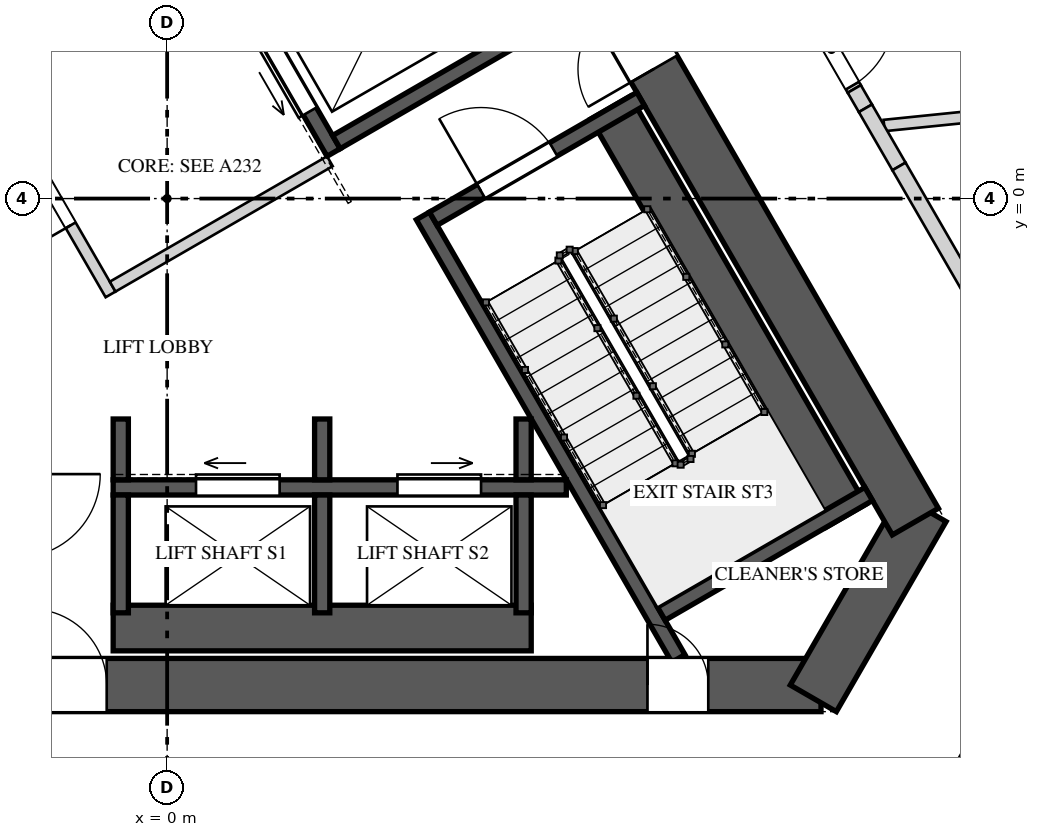
"""IFC4 building model, lengths in metres.
Left out: names, types, materials, properties, quantities, classifications, styles, units other than length and angle.
Written with IfcOpenShell. Run it as: python <this file> out.ifc"""

import sys

from ifc_helpers import new_model, si_unit, direction, frame, frame_2d, origin, place, context, subcontext, project, spatial, polyline, rectangle, outline, extrude, element, fill, save


model = new_model("IFC4")
c1 = context("Model", 3, precision=1e-05, world=origin(), true_north=direction((0.0, 1.0)))
c2 = subcontext(c1, "Body", "Model", "MODEL_VIEW")
j1 = project(units=[si_unit("LENGTHUNIT", "METRE"), si_unit("PLANEANGLEUNIT", "RADIAN")], contexts=[c1])
p1 = place(None, origin())
s1 = spatial("IfcSite", under=j1, at=p1, CompositionType="ELEMENT")
p2 = place(p1, origin())
s2 = spatial("IfcBuilding", under=s1, at=p2, CompositionType="ELEMENT")
p3 = place(p2, frame((0.0, 0.0, 237.2)))
s3 = spatial("IfcBuildingStorey", under=s2, at=p3, CompositionType="ELEMENT", Elevation=237.2)
p4 = place(p3, frame((-1.241, 10.65, 0.0), z_axis=(0.0, 0.0, 1.0), x_axis=(-0.500003331888, -0.866023480109, 0.0)))
e1 = element("IfcWall", 1, at=p4, inside=s3, PredefinedType="SHEAR", context=c2, shape_type="SweptSolid", body=[
    extrude(rectangle(XDim=17.205, YDim=0.7, at=frame_2d((8.603, 0.0))), origin(), (0.0, 0.0, 1.0), 4.0),
])
p5 = place(p4, frame((6.808, 0.0, 0.0)))
e2 = element("IfcOpeningElement", 2, at=p5, cuts=e1, PredefinedType="OPENING", context=c2, shape_type="SweptSolid", body=[
    extrude(rectangle(XDim=1.0, YDim=2.4, at=frame_2d((0.5, 1.2))), frame((0.0, 0.36, 0.0), z_axis=(0.0, -1.0, 0.0), x_axis=(1.0, 0.0, 0.0)), (0.0, 0.0, 1.0), 0.72),
])
p6 = place(p4, frame((14.922, 0.0, 0.0)))
e3 = element("IfcOpeningElement", 3, at=p6, cuts=e1, PredefinedType="OPENING", context=c2, shape_type="SweptSolid", body=[
    extrude(rectangle(XDim=0.8, YDim=2.1, at=frame_2d((0.4, 1.05))), frame((0.0, 0.36, 0.0), z_axis=(0.0, -1.0, 0.0), x_axis=(1.0, 0.0, 0.0)), (0.0, 0.0, 1.0), 0.72),
])
p7 = place(p3, frame((-8.603, -6.4, 0.0), z_axis=(0.0, 0.0, 1.0), x_axis=(1.0, 0.0, 0.0)))
e4 = element("IfcWall", 4, at=p7, inside=s3, PredefinedType="SHEAR", context=c2, shape_type="SweptSolid", body=[
    extrude(rectangle(XDim=17.205, YDim=0.7, at=frame_2d((8.603, 0.0))), origin(), (0.0, 0.0, 1.0), 4.0),
])
p8 = place(p7, frame((6.808, 0.0, 0.0)))
e5 = element("IfcOpeningElement", 5, at=p8, cuts=e4, PredefinedType="OPENING", context=c2, shape_type="SweptSolid", body=[
    extrude(rectangle(XDim=1.0, YDim=2.4, at=frame_2d((0.5, 1.2))), frame((0.0, 0.36, 0.0), z_axis=(0.0, -1.0, 0.0), x_axis=(1.0, 0.0, 0.0)), (0.0, 0.0, 1.0), 0.72),
])
p9 = place(p7, frame((14.922, 0.0, 0.0)))
e6 = element("IfcOpeningElement", 6, at=p9, cuts=e4, PredefinedType="OPENING", context=c2, shape_type="SweptSolid", body=[
    extrude(rectangle(XDim=0.8, YDim=2.1, at=frame_2d((0.4, 1.05))), frame((0.0, 0.36, 0.0), z_axis=(0.0, -1.0, 0.0), x_axis=(1.0, 0.0, 0.0)), (0.0, 0.0, 1.0), 0.72),
])
p10 = place(p3, frame((8.501, -6.575, 0.0), z_axis=(0.0, 0.0, 1.0), x_axis=(0.499995765644, 0.866027848477, 0.0)))
e7 = element("IfcWall", 7, at=p10, inside=s3, PredefinedType="SHEAR", context=c2, shape_type="SweptSolid", body=[
    extrude(rectangle(XDim=2.887, YDim=0.7, at=frame_2d((1.443, 0.0))), origin(), (0.0, 0.0, 1.0), 4.0),
])
p11 = place(p3, frame((9.844, -4.25, 0.0), z_axis=(0.0, 0.0, 1.0), x_axis=(-0.500003331888, 0.866023480109, 0.0)))
e8 = element("IfcWall", 8, at=p11, inside=s3, PredefinedType="SHEAR", context=c2, shape_type="SweptSolid", body=[
    extrude(rectangle(XDim=17.205, YDim=0.7, at=frame_2d((8.603, 0.0))), origin(), (0.0, 0.0, 1.0), 4.0),
])
p12 = place(p11, frame((6.877, 0.0, 0.0)))
e9 = element("IfcOpeningElement", 9, at=p12, cuts=e8, PredefinedType="OPENING", context=c2, shape_type="SweptSolid", body=[
    extrude(rectangle(XDim=1.0, YDim=2.4, at=frame_2d((0.5, 1.2))), frame((0.0, 0.36, 0.0), z_axis=(0.0, -1.0, 0.0), x_axis=(1.0, 0.0, 0.0)), (0.0, 0.0, 1.0), 0.72),
])
p13 = place(p3, frame((8.933, -4.172, 0.0), z_axis=(0.0, 0.0, 1.0), x_axis=(-0.500026960575, 0.86600983753, 0.0)))
e10 = element("IfcWall", 10, at=p13, inside=s3, PredefinedType="SOLIDWALL", context=c2, shape_type="SweptSolid", body=[
    extrude(rectangle(XDim=6.2, YDim=0.6, at=frame_2d((3.1, 0.0))), origin(), (0.0, 0.0, 1.0), 3.65),
])
p14 = place(p3, frame((6.726, -6.05, 0.0), z_axis=(0.0, 0.0, 1.0), x_axis=(-0.499970804718, 0.866042259032, 0.0)))
e11 = element("IfcWall", 11, at=p14, inside=s3, PredefinedType="SOLIDWALL", context=c2, shape_type="SweptSolid", body=[
    extrude(rectangle(XDim=6.723, YDim=0.2, at=frame_2d((3.361, 0.0))), origin(), (0.0, 0.0, 1.0), 3.65),
])
p15 = place(p3, frame((6.501, -5.461, 0.0), z_axis=(0.0, 0.0, 1.0), x_axis=(0.866035871367, 0.499981869177, 0.0)))
e12 = element("IfcWall", 12, at=p15, inside=s3, PredefinedType="SOLIDWALL", context=c2, shape_type="SweptSolid", body=[
    extrude(rectangle(XDim=3.15, YDim=0.2, at=frame_2d((1.575, 0.0))), origin(), (0.0, 0.0, 1.0), 3.65),
])
p16 = place(p3, frame((3.501, -0.265, 0.0), z_axis=(0.0, 0.0, 1.0), x_axis=(0.866035871367, 0.499981869177, 0.0)))
e13 = element("IfcWall", 13, at=p16, inside=s3, PredefinedType="SOLIDWALL", context=c2, shape_type="SweptSolid", body=[
    extrude(rectangle(XDim=3.15, YDim=0.2, at=frame_2d((1.575, 0.0))), origin(), (0.0, 0.0, 1.0), 3.65),
])
p17 = place(p16, frame((0.725, 0.0, 0.0)))
e14 = element("IfcOpeningElement", 14, at=p17, cuts=e13, PredefinedType="OPENING", context=c2, shape_type="SweptSolid", body=[
    extrude(rectangle(XDim=1.1, YDim=2.4, at=frame_2d((0.55, 1.2))), frame((0.0, 0.11, 0.0), z_axis=(0.0, -1.0, 0.0), x_axis=(1.0, 0.0, 0.0)), (0.0, 0.0, 1.0), 0.22),
])
p18 = place(p3, frame((-0.71, -3.8, 0.0), z_axis=(0.0, 0.0, 1.0), x_axis=(1.0, 0.0, 0.0)))
e15 = element("IfcWall", 15, at=p18, inside=s3, PredefinedType="SOLIDWALL", context=c2, shape_type="SweptSolid", body=[
    extrude(rectangle(XDim=5.961, YDim=0.2, at=frame_2d((2.981, 0.0))), origin(), (0.0, 0.0, 1.0), 3.65),
])
p19 = place(p18, frame((1.09, 0.0, 0.0)))
e16 = element("IfcOpeningElement", 16, at=p19, cuts=e15, PredefinedType="OPENING", context=c2, shape_type="SweptSolid", body=[
    extrude(rectangle(XDim=1.1, YDim=2.1, at=frame_2d((0.55, 1.05))), frame((0.0, 0.11, 0.0), z_axis=(0.0, -1.0, 0.0), x_axis=(1.0, 0.0, 0.0)), (0.0, 0.0, 1.0), 0.22),
])
p20 = place(p18, frame((3.74, 0.0, 0.0)))
e17 = element("IfcOpeningElement", 17, at=p20, cuts=e15, PredefinedType="OPENING", context=c2, shape_type="SweptSolid", body=[
    extrude(rectangle(XDim=1.1, YDim=2.1, at=frame_2d((0.55, 1.05))), frame((0.0, 0.11, 0.0), z_axis=(0.0, -1.0, 0.0), x_axis=(1.0, 0.0, 0.0)), (0.0, 0.0, 1.0), 0.22),
])
p21 = place(p3, frame((-0.71, -5.65, 0.0), z_axis=(0.0, 0.0, 1.0), x_axis=(1.0, 0.0, 0.0)))
e18 = element("IfcWall", 18, at=p21, inside=s3, PredefinedType="SOLIDWALL", context=c2, shape_type="SweptSolid", body=[
    extrude(rectangle(XDim=5.5, YDim=0.6, at=frame_2d((2.75, 0.0))), origin(), (0.0, 0.0, 1.0), 3.65),
])
p22 = place(p3, frame((-0.61, -3.9, 0.0), z_axis=(0.0, 0.0, 1.0), x_axis=(0.0, -1.0, 0.0)))
e19 = element("IfcWall", 19, at=p22, inside=s3, PredefinedType="SOLIDWALL", context=c2, shape_type="SweptSolid", body=[
    extrude(rectangle(XDim=1.55, YDim=0.2, at=frame_2d((0.775, 0.0))), origin(), (0.0, 0.0, 1.0), 3.65),
])
p23 = place(p3, frame((-0.61, -2.9, 0.0), z_axis=(0.0, 0.0, 1.0), x_axis=(0.0, -1.0, 0.0)))
e20 = element("IfcWall", 20, at=p23, inside=s3, PredefinedType="SOLIDWALL", context=c2, shape_type="SweptSolid", body=[
    extrude(rectangle(XDim=0.8, YDim=0.2, at=frame_2d((0.4, 0.0))), origin(), (0.0, 0.0, 1.0), 3.65),
])
p24 = place(p3, frame((2.04, -3.9, 0.0), z_axis=(0.0, 0.0, 1.0), x_axis=(0.0, -1.0, 0.0)))
e21 = element("IfcWall", 21, at=p24, inside=s3, PredefinedType="SOLIDWALL", context=c2, shape_type="SweptSolid", body=[
    extrude(rectangle(XDim=1.55, YDim=0.2, at=frame_2d((0.775, 0.0))), origin(), (0.0, 0.0, 1.0), 3.65),
])
p25 = place(p3, frame((2.04, -2.9, 0.0), z_axis=(0.0, 0.0, 1.0), x_axis=(0.0, -1.0, 0.0)))
e22 = element("IfcWall", 22, at=p25, inside=s3, PredefinedType="SOLIDWALL", context=c2, shape_type="SweptSolid", body=[
    extrude(rectangle(XDim=0.8, YDim=0.2, at=frame_2d((0.4, 0.0))), origin(), (0.0, 0.0, 1.0), 3.65),
])
p26 = place(p3, frame((4.69, -3.9, 0.0), z_axis=(0.0, 0.0, 1.0), x_axis=(0.0, -1.0, 0.0)))
e23 = element("IfcWall", 23, at=p26, inside=s3, PredefinedType="SOLIDWALL", context=c2, shape_type="SweptSolid", body=[
    extrude(rectangle(XDim=1.55, YDim=0.2, at=frame_2d((0.775, 0.0))), origin(), (0.0, 0.0, 1.0), 3.65),
])
p27 = place(p3, frame((4.69, -2.9, 0.0), z_axis=(0.0, 0.0, 1.0), x_axis=(0.0, -1.0, 0.0)))
e24 = element("IfcWall", 24, at=p27, inside=s3, PredefinedType="SOLIDWALL", context=c2, shape_type="SweptSolid", body=[
    extrude(rectangle(XDim=0.8, YDim=0.2, at=frame_2d((0.4, 0.0))), origin(), (0.0, 0.0, 1.0), 3.65),
])
p28 = place(p3, frame((2.19, 0.606, 0.0), z_axis=(0.0, 0.0, 1.0), x_axis=(-0.500002801628, 0.866023786258, 0.0)))
e25 = element("IfcWall", 25, at=p28, inside=s3, PredefinedType="SOLIDWALL", context=c2, shape_type="SweptSolid", body=[
    extrude(rectangle(XDim=4.9, YDim=0.2, at=frame_2d((2.45, 0.0))), origin(), (0.0, 0.0, 1.0), 3.65),
])
p29 = place(p28, frame((0.625, 0.0, 0.0)))
e26 = element("IfcOpeningElement", 26, at=p29, cuts=e25, PredefinedType="OPENING", context=c2, shape_type="SweptSolid", body=[
    extrude(rectangle(XDim=1.3, YDim=2.1, at=frame_2d((0.65, 1.05))), frame((0.0, 0.11, 0.0), z_axis=(0.0, -1.0, 0.0), x_axis=(1.0, 0.0, 0.0)), (0.0, 0.0, 1.0), 0.22),
])
p30 = place(p28, frame((2.975, 0.0, 0.0)))
e27 = element("IfcOpeningElement", 27, at=p30, cuts=e25, PredefinedType="OPENING", context=c2, shape_type="SweptSolid", body=[
    extrude(rectangle(XDim=1.3, YDim=2.1, at=frame_2d((0.65, 1.05))), frame((0.0, 0.11, 0.0), z_axis=(0.0, -1.0, 0.0), x_axis=(1.0, 0.0, 0.0)), (0.0, 0.0, 1.0), 0.22),
])
p31 = place(p3, frame((2.227, 0.743, 0.0), z_axis=(0.0, 0.0, 1.0), x_axis=(0.866022959057, 0.500004234368, 0.0)))
e28 = element("IfcWall", 28, at=p31, inside=s3, PredefinedType="SOLIDWALL", context=c2, shape_type="SweptSolid", body=[
    extrude(rectangle(XDim=3.75, YDim=0.2, at=frame_2d((1.875, 0.0))), origin(), (0.0, 0.0, 1.0), 3.65),
])
p32 = place(p3, frame((-0.744, -1.261, 0.0), z_axis=(0.0, 0.0, 1.0), x_axis=(-0.500004234368, 0.866022959057, 0.0)))
e29 = element("IfcWall", 29, at=p32, inside=s3, PredefinedType="PARTITIONING", context=c2, shape_type="SweptSolid", body=[
    extrude(rectangle(XDim=3.125, YDim=0.15, at=frame_2d((1.562, 0.0))), origin(), (0.0, 0.0, 1.0), 3.65),
])
p33 = place(p32, frame((1.05, 0.0, 0.0)))
e30 = element("IfcOpeningElement", 30, at=p33, cuts=e29, PredefinedType="OPENING", context=c2, shape_type="SweptSolid", body=[
    extrude(rectangle(XDim=1.1, YDim=2.4, at=frame_2d((0.55, 1.2))), frame((0.0, 0.085, 0.0), z_axis=(0.0, -1.0, 0.0), x_axis=(1.0, 0.0, 0.0)), (0.0, 0.0, 1.0), 0.17),
])
p34 = place(p3, frame((-0.717, -1.159, 0.0), z_axis=(0.0, 0.0, 1.0), x_axis=(0.866008176907, 0.50002983664, 0.0)))
e31 = element("IfcWall", 31, at=p34, inside=s3, PredefinedType="PARTITIONING", context=c2, shape_type="SweptSolid", body=[
    extrude(rectangle(XDim=3.3, YDim=0.15, at=frame_2d((1.65, 0.0))), origin(), (0.0, 0.0, 1.0), 3.65),
])
p35 = place(p3, frame((-2.178, 1.372, 0.0), z_axis=(0.0, 0.0, 1.0), x_axis=(0.258808958833, 0.96592852884, 0.0)))
e32 = element("IfcWall", 32, at=p35, inside=s3, PredefinedType="PARTITIONING", context=c2, shape_type="SweptSolid", body=[
    extrude(rectangle(XDim=2.903, YDim=0.15, at=frame_2d((1.451, 0.0))), origin(), (0.0, 0.0, 1.0), 3.65),
])
p36 = place(p3, frame((9.433, 0.961, 0.0), z_axis=(0.0, 0.0, 1.0), x_axis=(0.994848032618, 0.101377472819, 0.0)))
e33 = element("IfcWall", 33, at=p36, inside=s3, PredefinedType="PARTITIONING", context=c2, shape_type="SweptSolid", body=[
    extrude(rectangle(XDim=11.222, YDim=0.15, at=frame_2d((5.611, 0.0))), origin(), (0.0, 0.0, 1.0), 2.75),
])
p37 = place(p3, frame((12.048, -4.733, 0.0), z_axis=(0.0, 0.0, 1.0), x_axis=(-0.500005339912, -0.866022320763, 0.0)))
e34 = element("IfcWall", 34, at=p37, inside=s3, PredefinedType="SOLIDWALL", context=c2, shape_type="SweptSolid", body=[
    extrude(rectangle(XDim=3.362, YDim=0.2, at=frame_2d((1.681, 0.0))), origin(), (0.0, 0.0, 1.0), 3.65),
])
p38 = place(p3, frame((8.013, 3.22, 0.0), z_axis=(0.0, 0.0, 1.0), x_axis=(0.500014089762, -0.866017268904, 0.0)))
e35 = element("IfcWall", 35, at=p38, inside=s3, PredefinedType="SOLIDWALL", context=c2, shape_type="SweptSolid", body=[
    extrude(outline(polyline([(0.0, 0.0), (2.053, 0.0), (2.053, 3.65), (0.917, 3.65), (0.917, 2.55), (0.0, 2.55), (0.0, 0.0)])), frame((0.0, 0.1, 0.0), z_axis=(0.0, -1.0, 0.0), x_axis=(1.0, 0.0, 0.0)), (0.0, 0.0, 1.0), 0.2),
])
p39 = place(p38, frame((0.903, 0.0, 0.0)))
e36 = element("IfcOpeningElement", 36, at=p39, cuts=e35, PredefinedType="OPENING", context=c2, shape_type="SweptSolid", body=[
    extrude(rectangle(XDim=1.1, YDim=2.4, at=frame_2d((0.55, 1.2))), frame((0.0, 0.11, 0.0), z_axis=(0.0, -1.0, 0.0), x_axis=(1.0, 0.0, 0.0)), (0.0, 0.0, 1.0), 0.22),
])
p40 = place(p3, frame((9.04, 1.442, 0.0), z_axis=(0.0, 0.0, 1.0), x_axis=(0.499986503906, -0.866033195618, 0.0)))
e37 = element("IfcWall", 37, at=p40, inside=s3, PredefinedType="SOLIDWALL", context=c2, shape_type="SweptSolid", body=[
    extrude(rectangle(XDim=0.293, YDim=0.2, at=frame_2d((0.147, 0.0))), origin(), (0.0, 0.0, 1.0), 3.65),
])
p41 = place(p3, frame((9.187, 1.188, 0.0), z_axis=(0.0, 0.0, 1.0), x_axis=(0.500121072013, -0.86595549154, 0.0)))
e38 = element("IfcWall", 38, at=p41, inside=s3, PredefinedType="SOLIDWALL", context=c2, shape_type="SweptSolid", body=[
    extrude(rectangle(XDim=0.884, YDim=0.2, at=frame_2d((0.442, 0.0))), origin(), (0.0, 0.0, 1.0), 2.75),
])
p42 = place(p3, frame((9.629, 0.423, 0.0), z_axis=(0.0, 0.0, 1.0), x_axis=(0.499995433041, -0.866028040503, 0.0)))
e39 = element("IfcWall", 39, at=p42, inside=s3, PredefinedType="SOLIDWALL", context=c2, shape_type="SweptSolid", body=[
    extrude(rectangle(XDim=5.161, YDim=0.2, at=frame_2d((2.581, 0.0))), origin(), (0.0, 0.0, 1.0), 3.65),
])
p43 = place(p42, frame((1.785, 0.0, 0.0)))
e40 = element("IfcOpeningElement", 40, at=p43, cuts=e39, PredefinedType="OPENING", context=c2, shape_type="SweptSolid", body=[
    extrude(rectangle(XDim=1.1, YDim=2.4, at=frame_2d((0.55, 1.2))), frame((0.0, 0.11, 0.0), z_axis=(0.0, -1.0, 0.0), x_axis=(1.0, 0.0, 0.0)), (0.0, 0.0, 1.0), 0.22),
])
p44 = place(p17, origin())
e41 = element("IfcDoor", 41, at=p44, inside=s3, OperationType="SINGLE_SWING_RIGHT", PredefinedType="DOOR", context=c2, shape_type="SweptSolid", body=[
    extrude(rectangle(XDim=1.1, YDim=2.4, at=frame_2d((0.55, 1.2))), frame((0.0, 0.025, 0.0), z_axis=(0.0, -1.0, 0.0), x_axis=(1.0, 0.0, 0.0)), (0.0, 0.0, 1.0), 0.05),
])
fill(e14, e41)
p45 = place(p19, origin())
e42 = element("IfcDoor", 42, at=p45, inside=s3, OperationType="SLIDING_TO_LEFT", PredefinedType="DOOR", context=c2, shape_type="SweptSolid", body=[
    extrude(rectangle(XDim=1.1, YDim=2.1, at=frame_2d((0.55, 1.05))), frame((0.0, 0.025, 0.0), z_axis=(0.0, -1.0, 0.0), x_axis=(1.0, 0.0, 0.0)), (0.0, 0.0, 1.0), 0.05),
])
fill(e16, e42)
p46 = place(p20, origin())
e43 = element("IfcDoor", 43, at=p46, inside=s3, OperationType="SLIDING_TO_RIGHT", PredefinedType="DOOR", context=c2, shape_type="SweptSolid", body=[
    extrude(rectangle(XDim=1.1, YDim=2.1, at=frame_2d((0.55, 1.05))), frame((0.0, 0.025, 0.0), z_axis=(0.0, -1.0, 0.0), x_axis=(1.0, 0.0, 0.0)), (0.0, 0.0, 1.0), 0.05),
])
fill(e17, e43)
p47 = place(p29, origin())
e44 = element("IfcDoor", 44, at=p47, inside=s3, OperationType="SLIDING_TO_LEFT", PredefinedType="DOOR", context=c2, shape_type="SweptSolid", body=[
    extrude(rectangle(XDim=1.3, YDim=2.1, at=frame_2d((0.65, 1.05))), frame((0.0, 0.025, 0.0), z_axis=(0.0, -1.0, 0.0), x_axis=(1.0, 0.0, 0.0)), (0.0, 0.0, 1.0), 0.05),
])
fill(e26, e44)
p48 = place(p33, origin())
e45 = element("IfcDoor", 45, at=p48, inside=s3, OperationType="SINGLE_SWING_LEFT", PredefinedType="DOOR", context=c2, shape_type="SweptSolid", body=[
    extrude(rectangle(XDim=1.1, YDim=2.4, at=frame_2d((0.55, 1.2))), frame((0.0, 0.025, 0.0), z_axis=(0.0, -1.0, 0.0), x_axis=(1.0, 0.0, 0.0)), (0.0, 0.0, 1.0), 0.05),
])
fill(e30, e45)
p49 = place(p8, origin())
e46 = element("IfcDoor", 46, at=p49, inside=s3, OperationType="SINGLE_SWING_LEFT", PredefinedType="DOOR", context=c2, shape_type="SweptSolid", body=[
    extrude(rectangle(XDim=1.0, YDim=2.4, at=frame_2d((0.5, 1.2))), frame((0.0, 0.025, 0.0), z_axis=(0.0, -1.0, 0.0), x_axis=(1.0, 0.0, 0.0)), (0.0, 0.0, 1.0), 0.05),
])
fill(e5, e46)
p50 = place(p12, origin())
e47 = element("IfcDoor", 47, at=p50, inside=s3, OperationType="SINGLE_SWING_RIGHT", PredefinedType="DOOR", context=c2, shape_type="SweptSolid", body=[
    extrude(rectangle(XDim=1.0, YDim=2.4, at=frame_2d((0.5, 1.2))), frame((0.0, 0.025, 0.0), z_axis=(0.0, -1.0, 0.0), x_axis=(1.0, 0.0, 0.0)), (0.0, 0.0, 1.0), 0.05),
])
fill(e9, e47)
p51 = place(p9, origin())
e48 = element("IfcDoor", 48, at=p51, inside=s3, OperationType="SINGLE_SWING_RIGHT", PredefinedType="DOOR", context=c2, shape_type="SweptSolid", body=[
    extrude(rectangle(XDim=0.8, YDim=2.1, at=frame_2d((0.4, 1.05))), frame((0.0, 0.025, 0.0), z_axis=(0.0, -1.0, 0.0), x_axis=(1.0, 0.0, 0.0)), (0.0, 0.0, 1.0), 0.05),
])
fill(e6, e48)
p52 = place(p39, origin())
e49 = element("IfcDoor", 49, at=p52, inside=s3, OperationType="SINGLE_SWING_LEFT", PredefinedType="DOOR", context=c2, shape_type="SweptSolid", body=[
    extrude(rectangle(XDim=1.1, YDim=2.4, at=frame_2d((0.55, 1.2))), frame((0.0, 0.025, 0.0), z_axis=(0.0, -1.0, 0.0), x_axis=(1.0, 0.0, 0.0)), (0.0, 0.0, 1.0), 0.05),
])
fill(e36, e49)
save(model, sys.argv[1])
